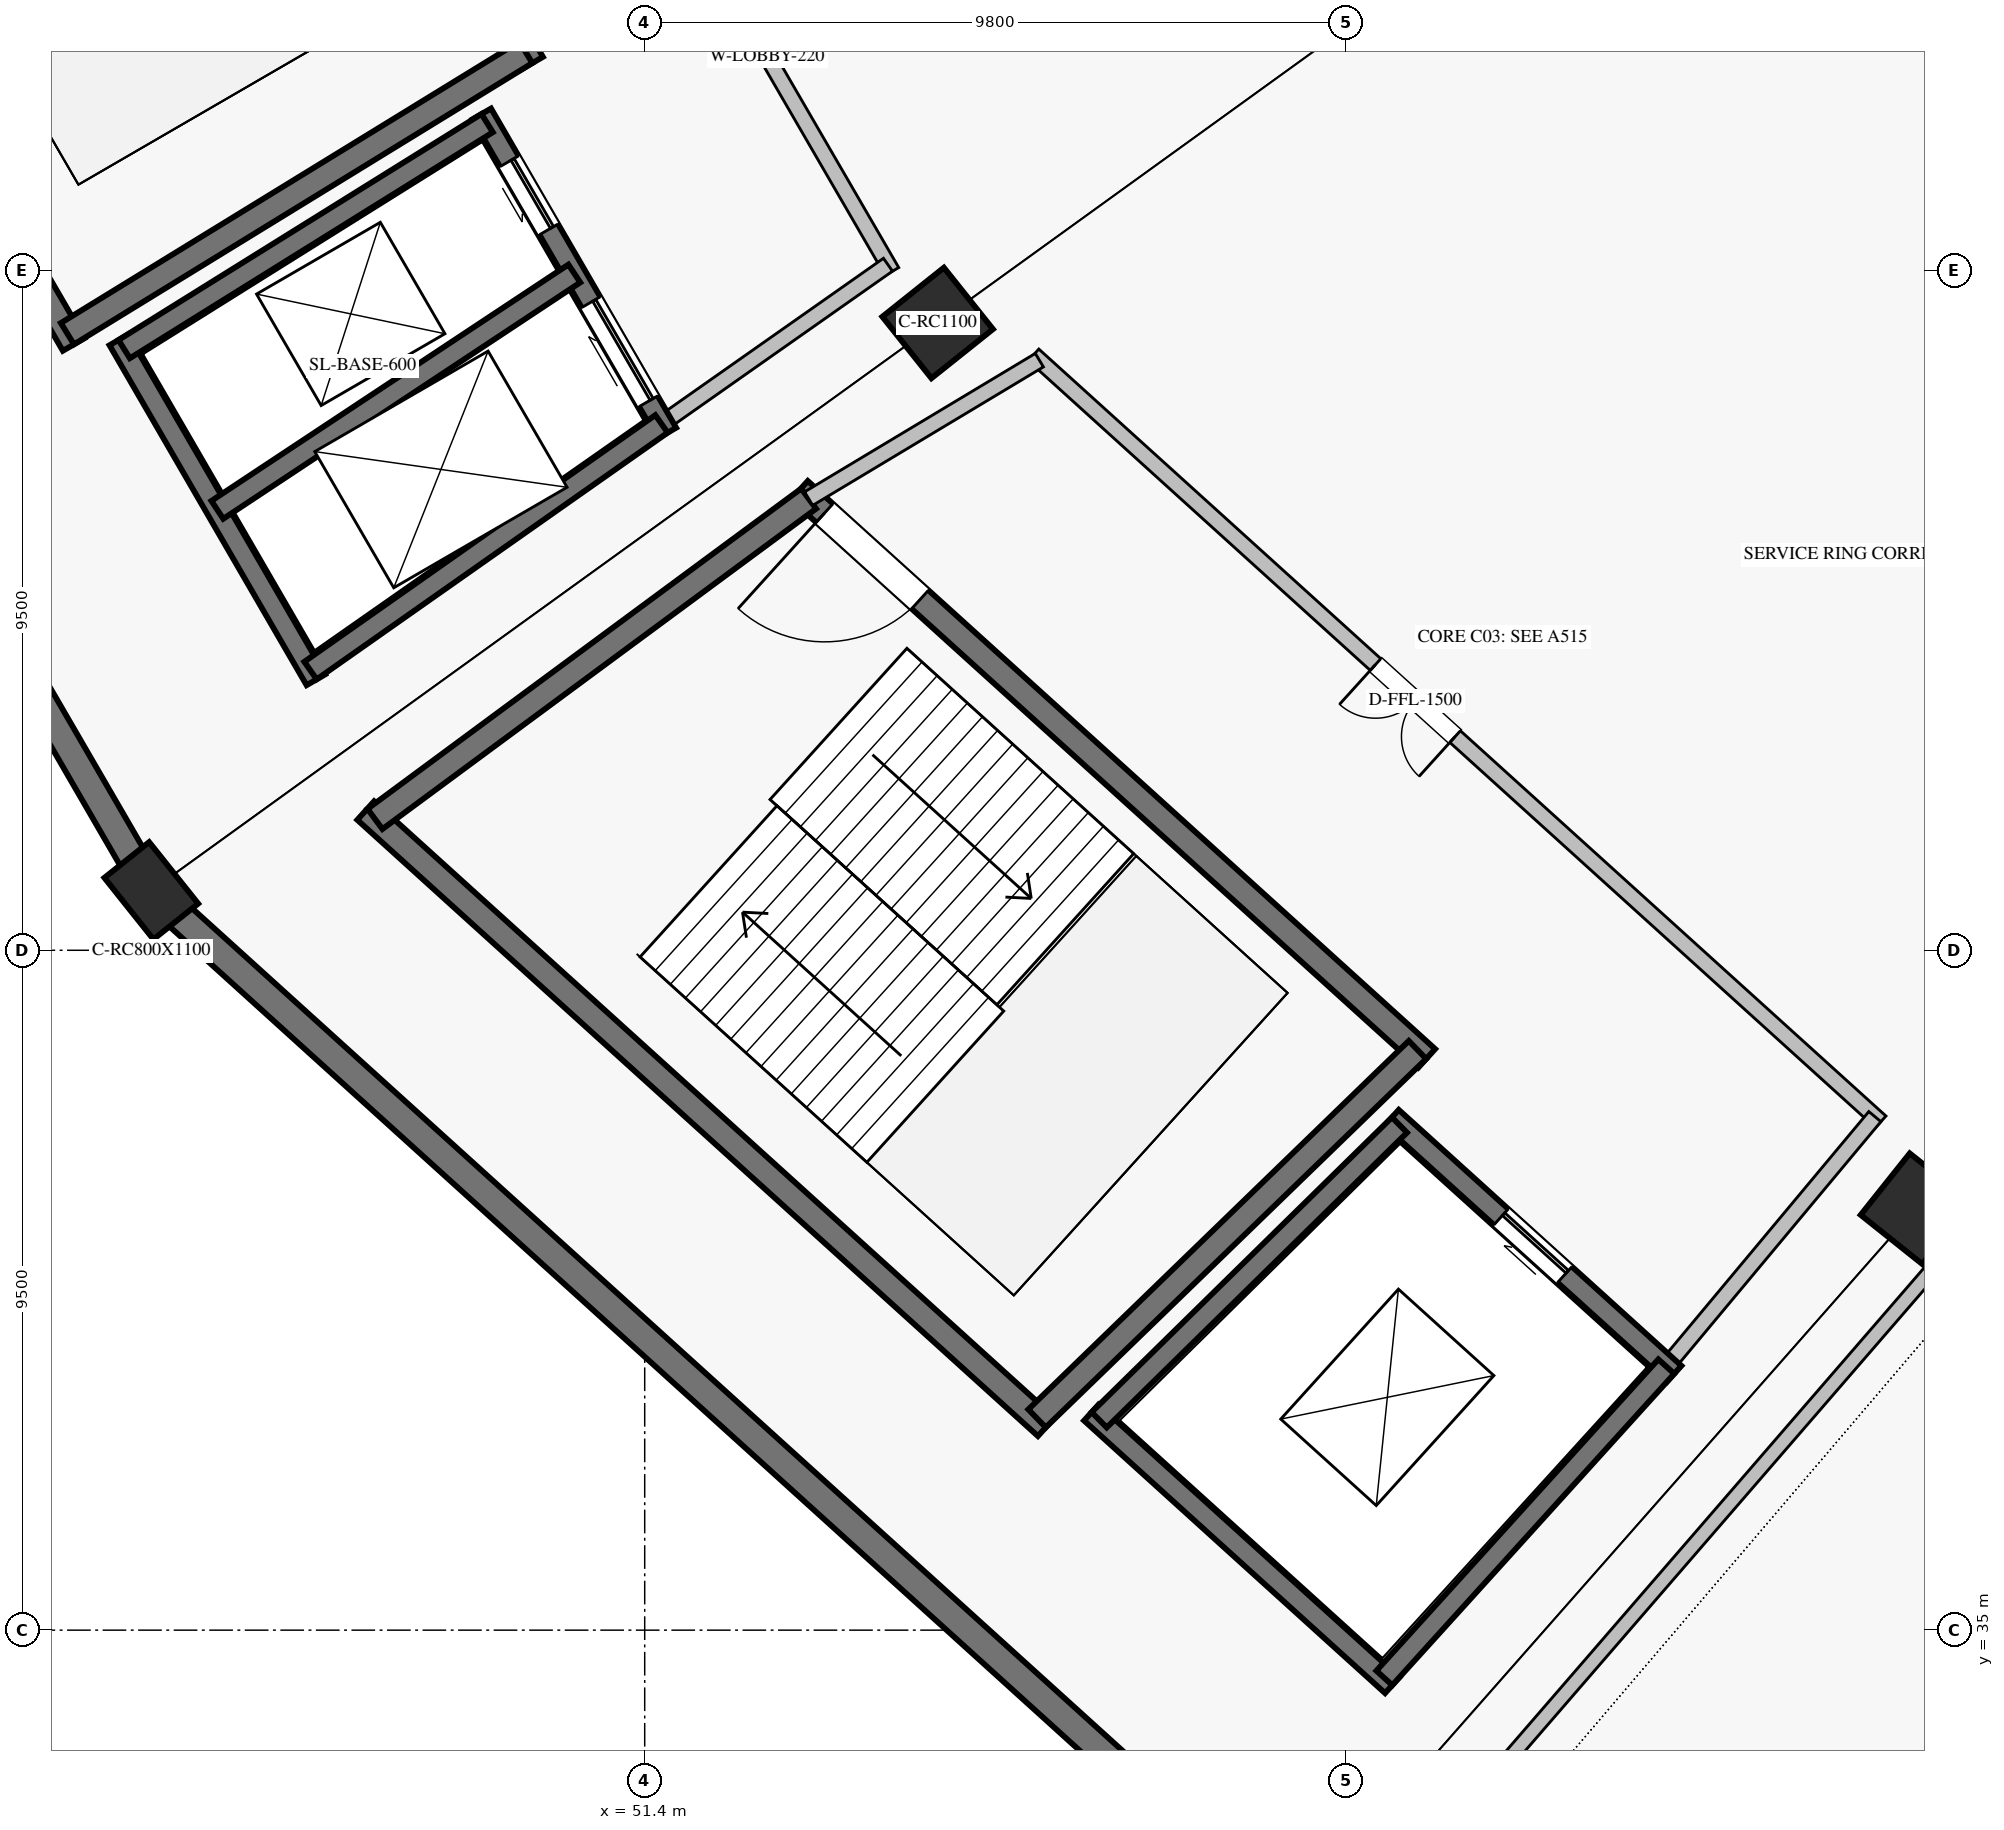
"""IFC4 building model, lengths in metres.
Left out: names, types, materials, properties, quantities, classifications, styles, units other than length and angle.
Written with IfcOpenShell. Run it as: python <this file> out.ifc"""

import sys

from ifc_helpers import new_model, si_unit, direction, frame, frame_2d, origin, origin_2d, place, context, subcontext, project, spatial, rectangle, extrude, element, fill, save


model = new_model("IFC4")
c1 = context("Model", 3, precision=1e-05, world=origin(), true_north=direction((0.0, 1.0)))
c2 = subcontext(c1, "Body", "Model", "MODEL_VIEW")
j1 = project(units=[si_unit("LENGTHUNIT", "METRE"), si_unit("PLANEANGLEUNIT", "RADIAN")], contexts=[c1])
p1 = place(None, origin())
s1 = spatial("IfcSite", under=j1, at=p1, CompositionType="ELEMENT")
p2 = place(p1, origin())
s2 = spatial("IfcBuilding", under=s1, at=p2, CompositionType="ELEMENT")
p3 = place(p2, frame((0.0, 0.0, -5.44)))
s3 = spatial("IfcBuildingStorey", under=s2, at=p3, CompositionType="ELEMENT", Elevation=-5.44)
for number, where, z_axis, x_axis in (
    (1, (55.494, 53.266, 0.0), (0.0, 0.0, 1.0), (-0.782, -0.623, 0.0)),
    (2, (69.166, 40.889, 0.0), (0.0, 0.0, 1.0), (-0.623, -0.782, 0.0)),
):
    element("IfcColumn", number, at=place(p3, frame(where, z_axis=z_axis, x_axis=x_axis)), inside=s3, PredefinedType="COLUMN", context=c2, shape_type="SweptSolid", body=[
        extrude(rectangle(XDim=1.1, YDim=1.1, at=origin_2d()), origin(), (0.0, 0.0, 1.0), 5.44),
    ])
p4 = place(p3, frame((44.505, 45.332, 0.0), z_axis=(0.0, 0.0, 1.0), x_axis=(-0.781831482473, -0.623489801853, 0.0)))
e3 = element("IfcColumn", 3, at=p4, inside=s3, PredefinedType="COLUMN", context=c2, shape_type="SweptSolid", body=[
    extrude(rectangle(XDim=0.8, YDim=1.1, at=origin_2d()), origin(), (0.0, 0.0, 1.0), 5.44),
])
p5 = place(p3, frame((34.311, 62.913, 0.0), z_axis=(0.0, 0.0, 1.0), x_axis=(0.501609752715, -0.865094015689, 0.0)))
e4 = element("IfcWall", 4, at=p5, inside=s3, PredefinedType="SOLIDWALL", context=c2, shape_type="SweptSolid", body=[
    extrude(rectangle(XDim=19.932, YDim=0.4, at=frame_2d((9.966, 0.0))), origin(), (0.0, 0.0, 1.0), 4.42),
])
p6 = place(p3, frame((44.794, 45.071, 0.0), z_axis=(0.0, 0.0, 1.0), x_axis=(0.741354093053, -0.671114080253, 0.0)))
e5 = element("IfcWall", 5, at=p6, inside=s3, PredefinedType="SOLIDWALL", context=c2, shape_type="SweptSolid", body=[
    extrude(rectangle(XDim=20.664, YDim=0.4, at=frame_2d((10.332, 0.0))), origin(), (0.0, 0.0, 1.0), 4.42),
])
p7 = place(p3, frame((44.09, 66.788, 0.0), z_axis=(0.0, 0.0, 1.0), x_axis=(0.501628624814, -0.865083072755, 0.0)))
e6 = element("IfcWall", 6, at=p7, inside=s3, PredefinedType="SHEAR", context=c2, shape_type="SweptSolid", body=[
    extrude(rectangle(XDim=11.435, YDim=0.35, at=frame_2d((5.718, 0.0))), origin(), (0.0, 0.0, 1.0), 5.14),
])
p8 = place(p7, frame((0.475, 0.0, 0.0)))
e7 = element("IfcOpeningElement", 7, at=p8, cuts=e6, PredefinedType="OPENING", context=c2, shape_type="SweptSolid", body=[
    extrude(rectangle(XDim=1.8, YDim=2.2, at=frame_2d((0.9, 1.1))), frame((0.0, 0.185, 0.0), z_axis=(0.0, -1.0, 0.0), x_axis=(1.0, 0.0, 0.0)), (0.0, 0.0, 1.0), 0.37),
])
p9 = place(p3, frame((37.198, 63.695, 0.0), z_axis=(0.0, 0.0, 1.0), x_axis=(0.501601740165, -0.865098661577, 0.0)))
e8 = element("IfcWall", 8, at=p9, inside=s3, PredefinedType="SHEAR", context=c2, shape_type="SweptSolid", body=[
    extrude(rectangle(XDim=12.405, YDim=0.35, at=frame_2d((6.202, 0.0))), origin(), (0.0, 0.0, 1.0), 5.14),
])
p10 = place(p3, frame((49.739, 57.046, 0.0), z_axis=(0.0, 0.0, 1.0), x_axis=(-0.852334575619, -0.522996913188, 0.0)))
e9 = element("IfcWall", 9, at=p10, inside=s3, PredefinedType="SHEAR", context=c2, shape_type="SweptSolid", body=[
    extrude(rectangle(XDim=7.516, YDim=0.35, at=frame_2d((3.758, 0.0))), origin(), (0.0, 0.0, 1.0), 5.14),
])
p11 = place(p3, frame((49.123, 56.188, 0.0), z_axis=(0.0, 0.0, 1.0), x_axis=(0.501629534056, -0.86508254552, 0.0)))
e10 = element("IfcWall", 10, at=p11, inside=s3, PredefinedType="SHEAR", context=c2, shape_type="SweptSolid", body=[
    extrude(rectangle(XDim=5.157, YDim=0.3, at=frame_2d((2.579, 0.0))), origin(), (0.0, 0.0, 1.0), 5.14),
])
p12 = place(p11, frame((0.766, 0.0, 0.0)))
e11 = element("IfcOpeningElement", 11, at=p12, cuts=e10, PredefinedType="OPENING", context=c2, shape_type="SweptSolid", body=[
    extrude(rectangle(XDim=1.1, YDim=2.2, at=frame_2d((0.55, 1.1))), frame((0.0, 0.16, 0.0), z_axis=(0.0, -1.0, 0.0), x_axis=(1.0, 0.0, 0.0)), (0.0, 0.0, 1.0), 0.32),
])
p13 = place(p11, frame((3.042, 0.0, 0.0)))
e12 = element("IfcOpeningElement", 12, at=p13, cuts=e10, PredefinedType="OPENING", context=c2, shape_type="SweptSolid", body=[
    extrude(rectangle(XDim=1.6, YDim=2.3, at=frame_2d((0.8, 1.15))), frame((0.0, 0.16, 0.0), z_axis=(0.0, -1.0, 0.0), x_axis=(1.0, 0.0, 0.0)), (0.0, 0.0, 1.0), 0.32),
])
p14 = place(p3, frame((44.05, 53.03, 0.0), z_axis=(0.0, 0.0, 1.0), x_axis=(0.501596987756, -0.865101417103, 0.0)))
e13 = element("IfcWall", 13, at=p14, inside=s3, PredefinedType="SHEAR", context=c2, shape_type="SweptSolid", body=[
    extrude(rectangle(XDim=5.491, YDim=0.3, at=frame_2d((2.746, 0.0))), origin(), (0.0, 0.0, 1.0), 5.14),
])
p15 = place(p3, frame((49.198, 56.058, 0.0), z_axis=(0.0, 0.0, 1.0), x_axis=(-0.848938067893, -0.528492343257, 0.0)))
e14 = element("IfcWall", 14, at=p15, inside=s3, PredefinedType="SHEAR", context=c2, shape_type="SweptSolid", body=[
    extrude(rectangle(XDim=5.975, YDim=0.3, at=frame_2d((2.988, 0.0))), origin(), (0.0, 0.0, 1.0), 5.14),
])
p16 = place(p3, frame((51.635, 51.855, 0.0), z_axis=(0.0, 0.0, 1.0), x_axis=(-0.818205158105, -0.574926359851, 0.0)))
e15 = element("IfcWall", 15, at=p16, inside=s3, PredefinedType="SHEAR", context=c2, shape_type="SweptSolid", body=[
    extrude(rectangle(XDim=5.995, YDim=0.3, at=frame_2d((2.998, 0.0))), origin(), (0.0, 0.0, 1.0), 5.14),
])
p17 = place(p3, frame((50.417, 53.957, 0.0), z_axis=(0.0, 0.0, 1.0), x_axis=(-0.833878900042, -0.551947443209, 0.0)))
e16 = element("IfcWall", 16, at=p17, inside=s3, PredefinedType="SHEAR", context=c2, shape_type="SweptSolid", body=[
    extrude(rectangle(XDim=5.983, YDim=0.3, at=frame_2d((2.991, 0.0))), origin(), (0.0, 0.0, 1.0), 5.14),
])
p18 = place(p3, frame((46.774, 67.921, 0.0), z_axis=(0.0, 0.0, 1.0), x_axis=(0.501612626242, -0.865092349518, 0.0)))
e17 = element("IfcWall", 17, at=p18, inside=s3, PredefinedType="SOLIDWALL", context=c2, shape_type="SweptSolid", body=[
    extrude(rectangle(XDim=16.11, YDim=0.22, at=frame_2d((8.055, 0.0))), origin(), (0.0, 0.0, 1.0), 4.088),
])
p19 = place(p18, frame((6.511, 0.0, 0.0)))
e18 = element("IfcOpeningElement", 18, at=p19, cuts=e17, PredefinedType="OPENING", context=c2, shape_type="SweptSolid", body=[
    extrude(rectangle(XDim=1.5, YDim=2.2, at=frame_2d((0.75, 1.1))), frame((0.0, 0.12, 0.0), z_axis=(0.0, -1.0, 0.0), x_axis=(1.0, 0.0, 0.0)), (0.0, 0.0, 1.0), 0.24),
])
p20 = place(p3, frame((54.8, 54.079, 0.0), z_axis=(0.0, 0.0, 1.0), x_axis=(-0.818225400643, -0.574897550649, 0.0)))
e19 = element("IfcWall", 19, at=p20, inside=s3, PredefinedType="SOLIDWALL", context=c2, shape_type="SweptSolid", body=[
    extrude(rectangle(XDim=3.868, YDim=0.22, at=frame_2d((1.934, 0.0))), origin(), (0.0, 0.0, 1.0), 5.14),
])
p21 = place(p3, frame((53.561, 50.928, 0.0), z_axis=(0.0, 0.0, 1.0), x_axis=(0.741358227035, -0.671109513572, 0.0)))
e20 = element("IfcWall", 20, at=p21, inside=s3, PredefinedType="SHEAR", context=c2, shape_type="SweptSolid", body=[
    extrude(rectangle(XDim=11.827, YDim=0.35, at=frame_2d((5.913, 0.0))), origin(), (0.0, 0.0, 1.0), 5.14),
])
p22 = place(p21, frame((0.475, 0.0, 0.0)))
e21 = element("IfcOpeningElement", 21, at=p22, cuts=e20, PredefinedType="OPENING", context=c2, shape_type="SweptSolid", body=[
    extrude(rectangle(XDim=1.8, YDim=2.2, at=frame_2d((0.9, 1.1))), frame((0.0, 0.185, 0.0), z_axis=(0.0, -1.0, 0.0), x_axis=(1.0, 0.0, 0.0)), (0.0, 0.0, 1.0), 0.37),
])
p23 = place(p3, frame((47.501, 46.452, 0.0), z_axis=(0.0, 0.0, 1.0), x_axis=(0.741351373721, -0.671117084183, 0.0)))
e22 = element("IfcWall", 22, at=p23, inside=s3, PredefinedType="SHEAR", context=c2, shape_type="SweptSolid", body=[
    extrude(rectangle(XDim=12.83, YDim=0.35, at=frame_2d((6.415, 0.0))), origin(), (0.0, 0.0, 1.0), 5.14),
])
p24 = place(p3, frame((53.691, 50.811, 0.0), z_axis=(0.0, 0.0, 1.0), x_axis=(-0.804395625347, -0.594093997548, 0.0)))
e23 = element("IfcWall", 23, at=p24, inside=s3, PredefinedType="SHEAR", context=c2, shape_type="SweptSolid", body=[
    extrude(rectangle(XDim=7.534, YDim=0.35, at=frame_2d((3.767, 0.0))), origin(), (0.0, 0.0, 1.0), 5.14),
])
p25 = place(p3, frame((62.199, 43.108, 0.0), z_axis=(0.0, 0.0, 1.0), x_axis=(-0.718297398554, -0.69573619083, 0.0)))
e24 = element("IfcWall", 24, at=p25, inside=s3, PredefinedType="SHEAR", context=c2, shape_type="SweptSolid", body=[
    extrude(rectangle(XDim=7.402, YDim=0.35, at=frame_2d((3.701, 0.0))), origin(), (0.0, 0.0, 1.0), 5.14),
])
p26 = place(p3, frame((61.837, 42.159, 0.0), z_axis=(0.0, 0.0, 1.0), x_axis=(0.741350155641, -0.671118429736, 0.0)))
e25 = element("IfcWall", 25, at=p26, inside=s3, PredefinedType="SHEAR", context=c2, shape_type="SweptSolid", body=[
    extrude(rectangle(XDim=5.329, YDim=0.3, at=frame_2d((2.665, 0.0))), origin(), (0.0, 0.0, 1.0), 5.14),
])
p27 = place(p26, frame((2.065, 0.0, 0.0)))
e26 = element("IfcOpeningElement", 26, at=p27, cuts=e25, PredefinedType="OPENING", context=c2, shape_type="SweptSolid", body=[
    extrude(rectangle(XDim=1.2, YDim=2.2, at=frame_2d((0.6, 1.1))), frame((0.0, 0.16, 0.0), z_axis=(0.0, -1.0, 0.0), x_axis=(1.0, 0.0, 0.0)), (0.0, 0.0, 1.0), 0.32),
])
p28 = place(p3, frame((57.64, 38.039, 0.0), z_axis=(0.0, 0.0, 1.0), x_axis=(0.74134208775, -0.671127341815, 0.0)))
e27 = element("IfcWall", 27, at=p28, inside=s3, PredefinedType="SHEAR", context=c2, shape_type="SweptSolid", body=[
    extrude(rectangle(XDim=5.675, YDim=0.3, at=frame_2d((2.837, 0.0))), origin(), (0.0, 0.0, 1.0), 5.14),
])
p29 = place(p3, frame((61.948, 42.059, 0.0), z_axis=(0.0, 0.0, 1.0), x_axis=(-0.713553028001, -0.700601224828, 0.0)))
e28 = element("IfcWall", 28, at=p29, inside=s3, PredefinedType="SHEAR", context=c2, shape_type="SweptSolid", body=[
    extrude(rectangle(XDim=5.881, YDim=0.3, at=frame_2d((2.94, 0.0))), origin(), (0.0, 0.0, 1.0), 5.14),
])
p30 = place(p3, frame((65.676, 38.684, 0.0), z_axis=(0.0, 0.0, 1.0), x_axis=(-0.67115829282, -0.741314067031, 0.0)))
e29 = element("IfcWall", 29, at=p30, inside=s3, PredefinedType="SHEAR", context=c2, shape_type="SweptSolid", body=[
    extrude(rectangle(XDim=5.871, YDim=0.3, at=frame_2d((2.935, 0.0))), origin(), (0.0, 0.0, 1.0), 5.14),
])
p31 = place(p3, frame((56.834, 52.819, 0.0), z_axis=(0.0, 0.0, 1.0), x_axis=(0.741351035574, -0.671117457717, 0.0)))
e30 = element("IfcWall", 30, at=p31, inside=s3, PredefinedType="SOLIDWALL", context=c2, shape_type="SweptSolid", body=[
    extrude(rectangle(XDim=15.969, YDim=0.22, at=frame_2d((7.985, 0.0))), origin(), (0.0, 0.0, 1.0), 5.14),
])
p32 = place(p31, frame((6.447, 0.0, 0.0)))
e31 = element("IfcOpeningElement", 31, at=p32, cuts=e30, PredefinedType="OPENING", context=c2, shape_type="SweptSolid", body=[
    extrude(rectangle(XDim=1.5, YDim=2.2, at=frame_2d((0.75, 1.1))), frame((0.0, 0.12, 0.0), z_axis=(0.0, -1.0, 0.0), x_axis=(1.0, 0.0, 0.0)), (0.0, 0.0, 1.0), 0.24),
])
p33 = place(p3, frame((56.915, 52.746, 0.0), z_axis=(0.0, 0.0, 1.0), x_axis=(-0.857424171966, -0.514610327654, 0.0)))
e32 = element("IfcWall", 32, at=p33, inside=s3, PredefinedType="SOLIDWALL", context=c2, shape_type="SweptSolid", body=[
    extrude(rectangle(XDim=3.76, YDim=0.22, at=frame_2d((1.88, 0.0))), origin(), (0.0, 0.0, 1.0), 5.14),
])
p34 = place(p3, frame((68.591, 42.176, 0.0), z_axis=(0.0, 0.0, 1.0), x_axis=(-0.640759627034, -0.767741558315, 0.0)))
e33 = element("IfcWall", 33, at=p34, inside=s3, PredefinedType="SOLIDWALL", context=c2, shape_type="SweptSolid", body=[
    extrude(rectangle(XDim=4.549, YDim=0.22, at=frame_2d((2.274, 0.0))), origin(), (0.0, 0.0, 1.0), 5.14),
])
p35 = place(p3, frame((69.599, 40.28, 0.0), z_axis=(0.0, 0.0, 1.0), x_axis=(-0.654293035882, -0.756241114458, 0.0)))
e34 = element("IfcWall", 34, at=p35, inside=s3, PredefinedType="PARTITIONING", context=c2, shape_type="SweptSolid", body=[
    extrude(rectangle(XDim=12.091, YDim=0.2, at=frame_2d((6.045, 0.0))), origin(), (0.0, 0.0, 1.0), 4.46),
])
p36 = place(p12, origin())
e35 = element("IfcDoor", 35, at=p36, inside=s3, OperationType="SLIDING_TO_RIGHT", PredefinedType="DOOR", context=c2, shape_type="SweptSolid", body=[
    extrude(rectangle(XDim=1.1, YDim=2.2, at=frame_2d((0.55, 1.1))), frame((0.0, 0.025, 0.0), z_axis=(0.0, -1.0, 0.0), x_axis=(1.0, 0.0, 0.0)), (0.0, 0.0, 1.0), 0.05),
])
fill(e11, e35)
p37 = place(p13, origin())
e36 = element("IfcDoor", 36, at=p37, inside=s3, OperationType="SLIDING_TO_LEFT", PredefinedType="DOOR", context=c2, shape_type="SweptSolid", body=[
    extrude(rectangle(XDim=1.6, YDim=2.3, at=frame_2d((0.8, 1.15))), frame((0.0, 0.025, 0.0), z_axis=(0.0, -1.0, 0.0), x_axis=(1.0, 0.0, 0.0)), (0.0, 0.0, 1.0), 0.05),
])
fill(e12, e36)
p38 = place(p22, frame((1.8, 0.0, 0.0), z_axis=(0.0, 0.0, 1.0), x_axis=(-1.0, 0.0, 0.0)))
e37 = element("IfcDoor", 37, at=p38, inside=s3, OperationType="SINGLE_SWING_RIGHT", PredefinedType="DOOR", context=c2, shape_type="SweptSolid", body=[
    extrude(rectangle(XDim=1.8, YDim=2.2, at=frame_2d((0.9, 1.1))), frame((0.0, 0.025, 0.0), z_axis=(0.0, -1.0, 0.0), x_axis=(1.0, 0.0, 0.0)), (0.0, 0.0, 1.0), 0.05),
])
fill(e21, e37)
p39 = place(p27, origin())
e38 = element("IfcDoor", 38, at=p39, inside=s3, OperationType="SLIDING_TO_LEFT", PredefinedType="DOOR", context=c2, shape_type="SweptSolid", body=[
    extrude(rectangle(XDim=1.2, YDim=2.2, at=frame_2d((0.6, 1.1))), frame((0.0, 0.025, 0.0), z_axis=(0.0, -1.0, 0.0), x_axis=(1.0, 0.0, 0.0)), (0.0, 0.0, 1.0), 0.05),
])
fill(e26, e38)
p40 = place(p32, frame((1.5, 0.0, 0.0), z_axis=(0.0, 0.0, 1.0), x_axis=(-1.0, 0.0, 0.0)))
e39 = element("IfcDoor", 39, at=p40, inside=s3, OperationType="DOUBLE_DOOR_SINGLE_SWING", PredefinedType="DOOR", context=c2, shape_type="SweptSolid", body=[
    extrude(rectangle(XDim=1.5, YDim=2.2, at=frame_2d((0.75, 1.1))), frame((0.0, 0.025, 0.0), z_axis=(0.0, -1.0, 0.0), x_axis=(1.0, 0.0, 0.0)), (0.0, 0.0, 1.0), 0.05),
])
fill(e31, e39)
save(model, sys.argv[1])
